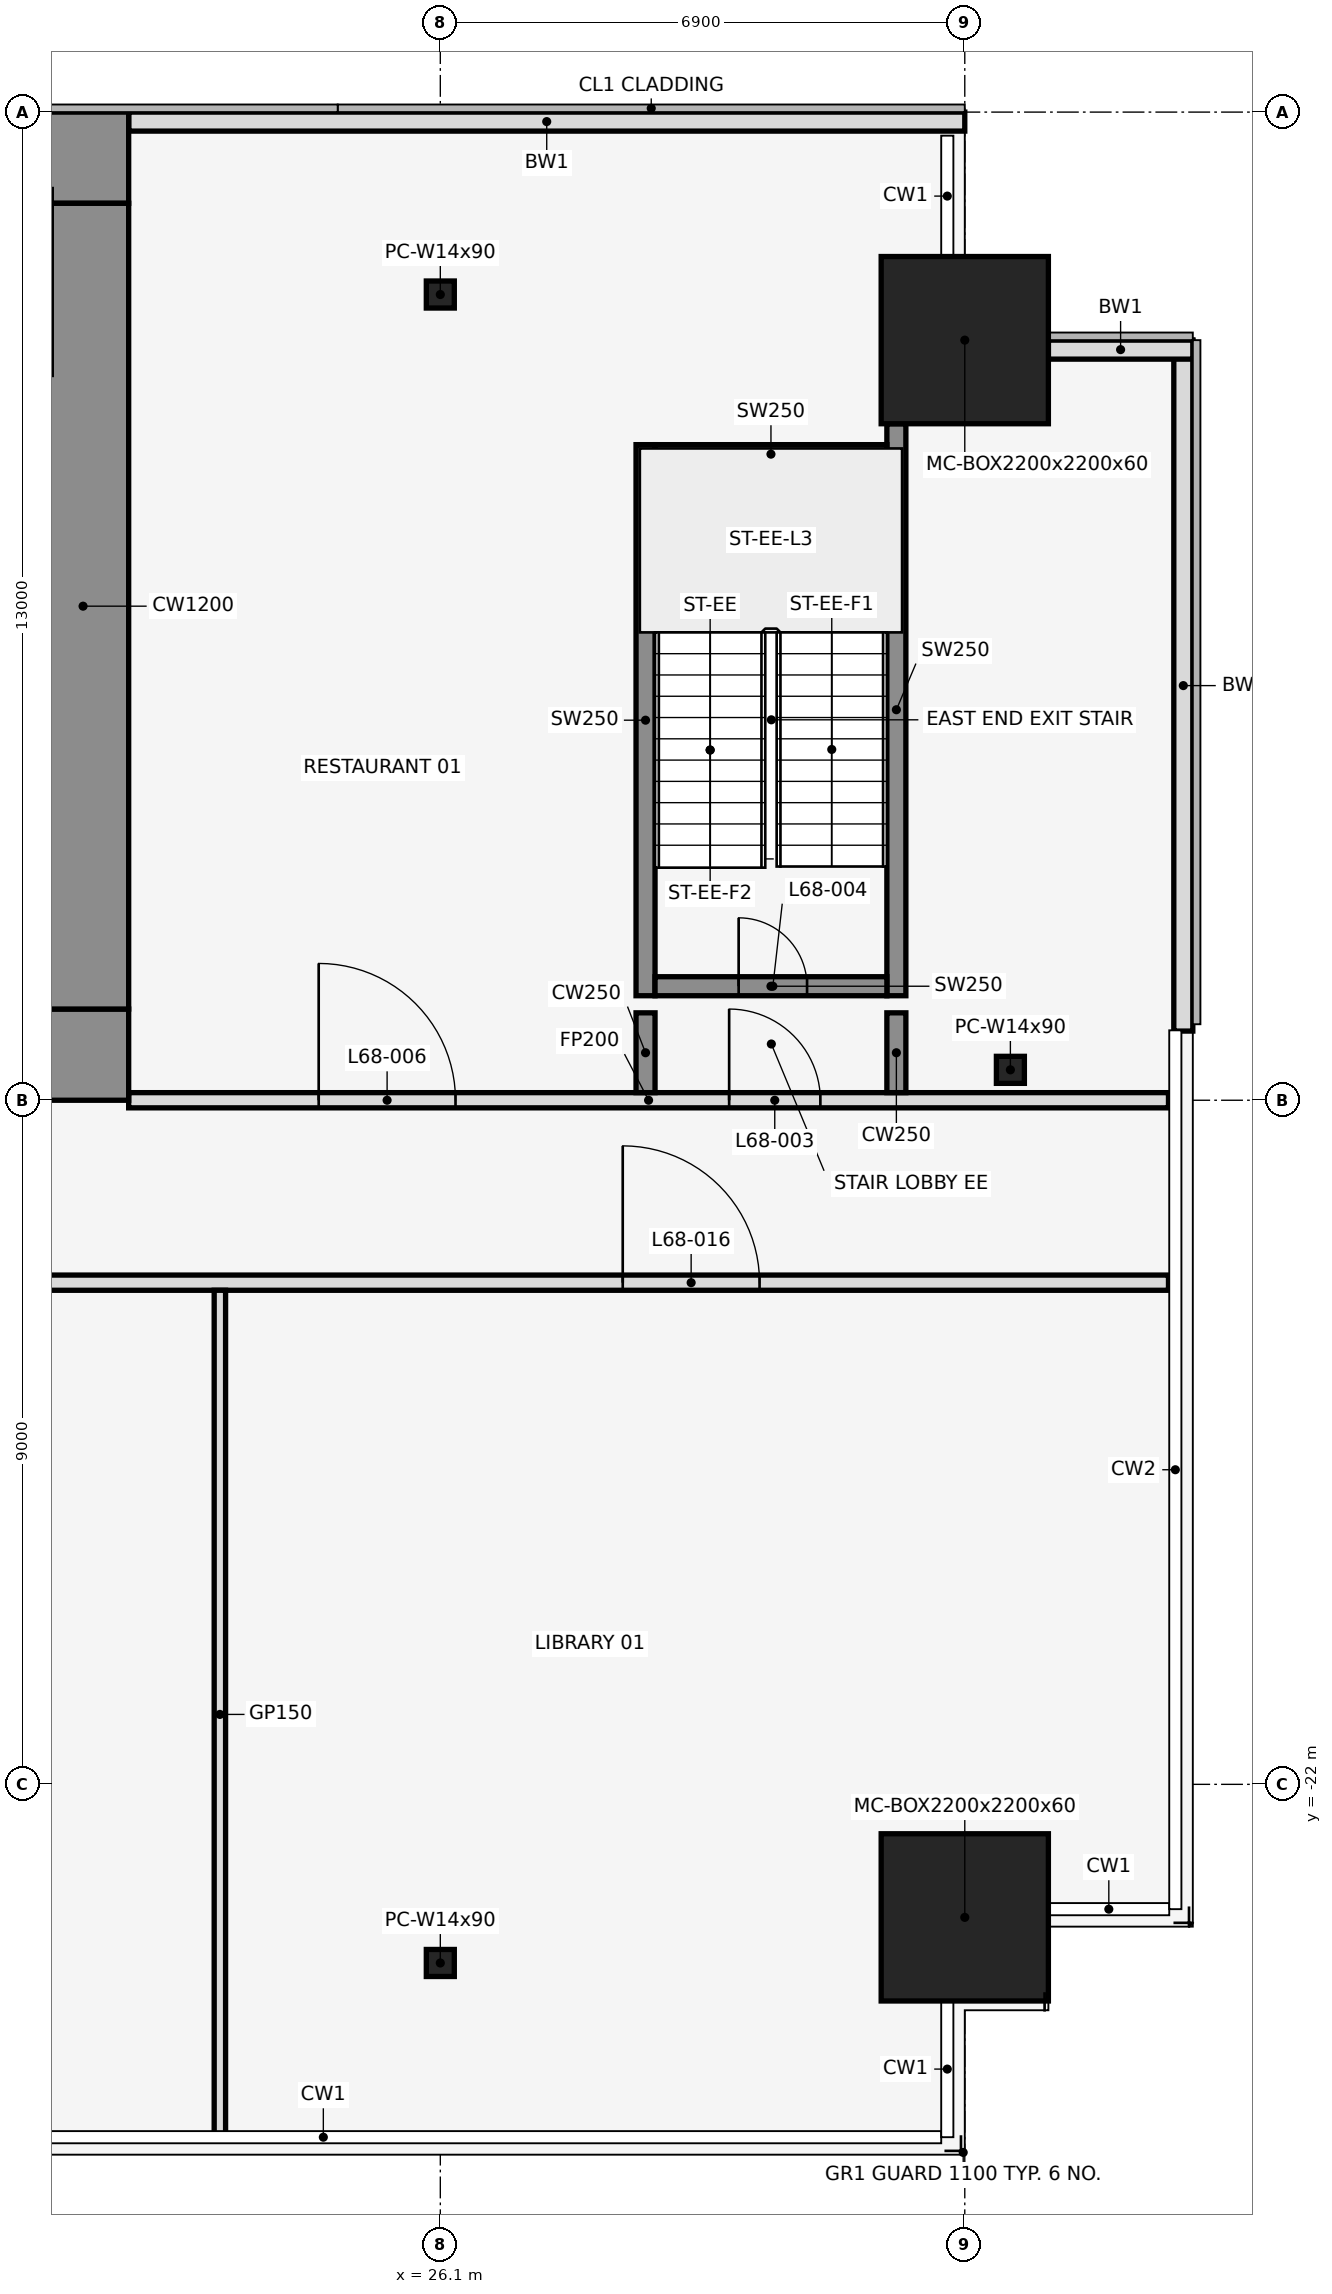
"""IFC4 building model, lengths in metres.
Left out: names, types, materials, properties, quantities, classifications, styles, units other than length and angle.
Written with IfcOpenShell. Run it as: python <this file> out.ifc"""

import sys

from ifc_helpers import new_model, si_unit, direction, frame, frame_2d, origin, origin_2d, place, context, subcontext, project, spatial, rectangle, hollow_rectangle, i_section, extrude, element, fill, save


model = new_model("IFC4")
c1 = context("Model", 3, precision=1e-05, world=origin(), true_north=direction((0.0, 1.0)))
c2 = subcontext(c1, "Body", "Model", "MODEL_VIEW")
j1 = project(units=[si_unit("LENGTHUNIT", "METRE"), si_unit("PLANEANGLEUNIT", "RADIAN")], contexts=[c1])
p1 = place(None, origin())
s1 = spatial("IfcSite", under=j1, at=p1, CompositionType="ELEMENT")
p2 = place(p1, origin())
s2 = spatial("IfcBuilding", under=s1, at=p2, CompositionType="ELEMENT")
p3 = place(p2, frame((0.0, 0.0, 302.0)))
s3 = spatial("IfcBuildingStorey", under=s2, at=p3, CompositionType="ELEMENT", Elevation=302.0)
for number, where, z_axis, x_axis in (
    (1, (26.1, -24.35, 0.0), (0.0, 0.0, 1.0), (1.0, 0.0, 0.0)),
    (2, (26.1, -2.4, 0.0), (0.0, 0.0, 1.0), (1.0, 0.0, 0.0)),
):
    element("IfcColumn", number, at=place(p3, frame(where, z_axis=z_axis, x_axis=x_axis)), inside=s3, PredefinedType="COLUMN", context=c2, shape_type="SweptSolid", body=[
        extrude(i_section(OverallWidth=0.368, OverallDepth=0.356, WebThickness=0.011, FlangeThickness=0.018, at=origin_2d()), origin(), (0.0, 0.0, 1.0), 4.5),
    ])
for number, where, z_axis, x_axis in (
    (3, (33.0, -23.75, 0.0), (0.0, 0.0, 1.0), (1.0, 0.0, 0.0)),
    (4, (33.0, -3.0, 0.0), (0.0, 0.0, 1.0), (1.0, 0.0, 0.0)),
):
    element("IfcColumn", number, at=place(p3, frame(where, z_axis=z_axis, x_axis=x_axis)), inside=s3, PredefinedType="COLUMN", context=c2, shape_type="SweptSolid", body=[
        extrude(hollow_rectangle(XDim=2.2, YDim=2.2, WallThickness=0.06, at=origin_2d()), origin(), (0.0, 0.0, 1.0), 4.5),
    ])
p4 = place(p3, frame((33.6, -12.6, 0.0), z_axis=(0.0, 0.0, 1.0), x_axis=(1.0, 0.0, 0.0)))
e5 = element("IfcColumn", 5, at=p4, inside=s3, PredefinedType="COLUMN", context=c2, shape_type="SweptSolid", body=[
    extrude(i_section(OverallWidth=0.368, OverallDepth=0.356, WebThickness=0.011, FlangeThickness=0.018, at=origin_2d()), origin(), (0.0, 0.0, 1.0), 4.5),
])
p5 = place(p3, frame((33.0, -0.125, 0.0), z_axis=(0.0, 0.0, 1.0), x_axis=(-1.0, 0.0, 0.0)))
e6 = element("IfcWall", 6, at=p5, inside=s3, PredefinedType="STANDARD", context=c2, shape_type="SweptSolid", body=[
    extrude(rectangle(XDim=11.0, YDim=0.25, at=frame_2d((5.5, 0.0))), origin(), (0.0, 0.0, 1.0), 4.35),
])
p6 = place(p3, frame((35.875, -12.09, 0.0), z_axis=(0.0, 0.0, 1.0), x_axis=(0.0, 1.0, 0.0)))
e7 = element("IfcWall", 7, at=p6, inside=s3, PredefinedType="STANDARD", context=c2, shape_type="SweptSolid", body=[
    extrude(rectangle(XDim=9.09, YDim=0.25, at=frame_2d((4.545, 0.0))), origin(), (0.0, 0.0, 1.0), 4.35),
])
p7 = place(p3, frame((36.0, -3.125, 0.0), z_axis=(0.0, 0.0, 1.0), x_axis=(-1.0, 0.0, 0.0)))
e8 = element("IfcWall", 8, at=p7, inside=s3, PredefinedType="STANDARD", context=c2, shape_type="SweptSolid", body=[
    extrude(rectangle(XDim=1.9, YDim=0.25, at=frame_2d((0.95, 0.0))), origin(), (0.0, 0.0, 1.0), 4.35),
])
p8 = place(p3, frame((28.8, -11.625, 0.0), z_axis=(0.0, 0.0, 1.0), x_axis=(0.0, 1.0, 0.0)))
e9 = element("IfcWall", 9, at=p8, inside=s3, PredefinedType="SHEAR", context=c2, shape_type="SweptSolid", body=[
    extrude(rectangle(XDim=7.25, YDim=0.25, at=frame_2d((3.625, 0.0))), origin(), (0.0, 0.0, 1.0), 4.5),
])
p9 = place(p3, frame((32.1, -11.625, 0.0), z_axis=(0.0, 0.0, 1.0), x_axis=(0.0, 1.0, 0.0)))
e10 = element("IfcWall", 10, at=p9, inside=s3, PredefinedType="SHEAR", context=c2, shape_type="SweptSolid", body=[
    extrude(rectangle(XDim=7.525, YDim=0.25, at=frame_2d((3.762, 0.0))), origin(), (0.0, 0.0, 1.0), 4.5),
])
p10 = place(p3, frame((28.925, -11.5, 0.0), z_axis=(0.0, 0.0, 1.0), x_axis=(1.0, 0.0, 0.0)))
e11 = element("IfcWall", 11, at=p10, inside=s3, PredefinedType="SHEAR", context=c2, shape_type="SweptSolid", body=[
    extrude(rectangle(XDim=3.05, YDim=0.25, at=frame_2d((1.525, 0.0))), origin(), (0.0, 0.0, 1.0), 4.5),
])
p11 = place(p10, frame((1.1, 0.0, 0.0)))
e12 = element("IfcOpeningElement", 12, at=p11, cuts=e11, PredefinedType="OPENING", context=c2, shape_type="SweptSolid", body=[
    extrude(rectangle(XDim=0.9, YDim=2.1, at=frame_2d((0.45, 1.05))), frame((0.0, 0.137, 0.0), z_axis=(0.0, -1.0, 0.0), x_axis=(1.0, 0.0, 0.0)), (0.0, 0.0, 1.0), 0.274),
])
p12 = place(p3, frame((28.925, -4.5, 0.0), z_axis=(0.0, 0.0, 1.0), x_axis=(1.0, 0.0, 0.0)))
e13 = element("IfcWall", 13, at=p12, inside=s3, PredefinedType="SHEAR", context=c2, shape_type="SweptSolid", body=[
    extrude(rectangle(XDim=3.05, YDim=0.25, at=frame_2d((1.525, 0.0))), origin(), (0.0, 0.0, 1.0), 4.5),
])
p13 = place(p3, frame((1.4, -15.4, 0.0), z_axis=(0.0, 0.0, 1.0), x_axis=(1.0, 0.0, 0.0)))
e14 = element("IfcWall", 14, at=p13, inside=s3, PredefinedType="PARTITIONING", context=c2, shape_type="SweptSolid", body=[
    extrude(rectangle(XDim=34.28, YDim=0.2, at=frame_2d((17.14, 0.0))), origin(), (0.0, 0.0, 1.0), 3.418),
])
p14 = place(p13, frame((4.2, 0.0, 0.0)))
e15 = element("IfcOpeningElement", 15, at=p14, cuts=e14, PredefinedType="OPENING", context=c2, shape_type="SweptSolid", body=[
    extrude(rectangle(XDim=1.8, YDim=2.1, at=frame_2d((0.9, 1.05))), frame((0.0, 0.112, 0.0), z_axis=(0.0, -1.0, 0.0), x_axis=(1.0, 0.0, 0.0)), (0.0, 0.0, 1.0), 0.224),
])
p15 = place(p13, frame((15.5, 0.0, 0.0)))
e16 = element("IfcOpeningElement", 16, at=p15, cuts=e14, PredefinedType="OPENING", context=c2, shape_type="SweptSolid", body=[
    extrude(rectangle(XDim=1.0, YDim=2.1, at=frame_2d((0.5, 1.05))), frame((0.0, 0.112, 0.0), z_axis=(0.0, -1.0, 0.0), x_axis=(1.0, 0.0, 0.0)), (0.0, 0.0, 1.0), 0.224),
])
p16 = place(p13, frame((27.1, 0.0, 0.0)))
e17 = element("IfcOpeningElement", 17, at=p16, cuts=e14, PredefinedType="OPENING", context=c2, shape_type="SweptSolid", body=[
    extrude(rectangle(XDim=1.8, YDim=2.1, at=frame_2d((0.9, 1.05))), frame((0.0, 0.112, 0.0), z_axis=(0.0, -1.0, 0.0), x_axis=(1.0, 0.0, 0.0)), (0.0, 0.0, 1.0), 0.224),
])
p17 = place(p3, frame((22.0, -13.0, 0.0), z_axis=(0.0, 0.0, 1.0), x_axis=(1.0, 0.0, 0.0)))
e18 = element("IfcWall", 18, at=p17, inside=s3, PredefinedType="PARTITIONING", context=c2, shape_type="SweptSolid", body=[
    extrude(rectangle(XDim=13.68, YDim=0.2, at=frame_2d((6.84, 0.0))), origin(), (0.0, 0.0, 1.0), 3.418),
])
p18 = place(p17, frame((7.9, 0.0, 0.0)))
e19 = element("IfcOpeningElement", 19, at=p18, cuts=e18, PredefinedType="OPENING", context=c2, shape_type="SweptSolid", body=[
    extrude(rectangle(XDim=1.2, YDim=2.1, at=frame_2d((0.6, 1.05))), frame((0.0, 0.112, 0.0), z_axis=(0.0, -1.0, 0.0), x_axis=(1.0, 0.0, 0.0)), (0.0, 0.0, 1.0), 0.224),
])
p19 = place(p17, frame((2.5, 0.0, 0.0)))
e20 = element("IfcOpeningElement", 20, at=p19, cuts=e18, PredefinedType="OPENING", context=c2, shape_type="SweptSolid", body=[
    extrude(rectangle(XDim=1.8, YDim=2.1, at=frame_2d((0.9, 1.05))), frame((0.0, 0.112, 0.0), z_axis=(0.0, -1.0, 0.0), x_axis=(1.0, 0.0, 0.0)), (0.0, 0.0, 1.0), 0.224),
])
p20 = place(p3, frame((23.2, -26.66, 0.0), z_axis=(0.0, 0.0, 1.0), x_axis=(0.0, 1.0, 0.0)))
e21 = element("IfcWall", 21, at=p20, inside=s3, PredefinedType="PARTITIONING", context=c2, shape_type="SweptSolid", body=[
    extrude(rectangle(XDim=11.16, YDim=0.15, at=frame_2d((5.58, 0.0))), origin(), (0.0, 0.0, 1.0), 3.418),
])
for number, where, z_axis, x_axis in (
    (22, (28.8, -12.9, 0.0), (0.0, 0.0, 1.0), (0.0, 1.0, 0.0)),
    (23, (32.1, -12.9, 0.0), (0.0, 0.0, 1.0), (0.0, 1.0, 0.0)),
):
    element("IfcWall", number, at=place(p3, frame(where, z_axis=z_axis, x_axis=x_axis)), inside=s3, PredefinedType="SHEAR", context=c2, shape_type="SweptSolid", body=[
        extrude(rectangle(XDim=1.05, YDim=0.25, at=frame_2d((0.525, 0.0))), origin(), (0.0, 0.0, 1.0), 4.5),
    ])
p21 = place(p3, frame((-22.0, -0.6, 0.0), z_axis=(0.0, 0.0, 1.0), x_axis=(1.0, 0.0, 0.0)))
e24 = element("IfcWall", 24, at=p21, inside=s3, PredefinedType="SHEAR", context=c2, shape_type="SweptSolid", body=[
    extrude(rectangle(XDim=44.0, YDim=1.2, at=frame_2d((22.0, 0.0))), origin(), (0.0, 0.0, 1.0), 4.5),
])
p22 = place(p21, frame((18.55, 0.0, 0.0)))
e25 = element("IfcOpeningElement", 25, at=p22, cuts=e24, PredefinedType="OPENING", context=c2, shape_type="SweptSolid", body=[
    extrude(rectangle(XDim=0.9, YDim=2.1, at=frame_2d((0.45, 1.05))), frame((0.0, 0.612, 0.0), z_axis=(0.0, -1.0, 0.0), x_axis=(1.0, 0.0, 0.0)), (0.0, 0.0, 1.0), 1.224),
])
p23 = place(p21, frame((24.55, 0.0, 0.0)))
e26 = element("IfcOpeningElement", 26, at=p23, cuts=e24, PredefinedType="OPENING", context=c2, shape_type="SweptSolid", body=[
    extrude(rectangle(XDim=0.9, YDim=2.1, at=frame_2d((0.45, 1.05))), frame((0.0, 0.612, 0.0), z_axis=(0.0, -1.0, 0.0), x_axis=(1.0, 0.0, 0.0)), (0.0, 0.0, 1.0), 1.224),
])
p24 = place(p3, frame((-22.0, -12.4, 0.0), z_axis=(0.0, 0.0, 1.0), x_axis=(1.0, 0.0, 0.0)))
e27 = element("IfcWall", 27, at=p24, inside=s3, PredefinedType="SHEAR", context=c2, shape_type="SweptSolid", body=[
    extrude(rectangle(XDim=44.0, YDim=1.2, at=frame_2d((22.0, 0.0))), origin(), (0.0, 0.0, 1.0), 4.5),
])
p25 = place(p24, frame((2.2, 0.0, 0.0)))
e28 = element("IfcOpeningElement", 28, at=p25, cuts=e27, PredefinedType="OPENING", context=c2, shape_type="SweptSolid", body=[
    extrude(rectangle(XDim=1.2, YDim=2.1, at=frame_2d((0.6, 1.05))), frame((0.0, 0.612, 0.0), z_axis=(0.0, -1.0, 0.0), x_axis=(1.0, 0.0, 0.0)), (0.0, 0.0, 1.0), 1.224),
])
p26 = place(p24, frame((21.4, 0.0, 0.0)))
e29 = element("IfcOpeningElement", 29, at=p26, cuts=e27, PredefinedType="OPENING", context=c2, shape_type="SweptSolid", body=[
    extrude(rectangle(XDim=1.2, YDim=2.1, at=frame_2d((0.6, 1.05))), frame((0.0, 0.612, 0.0), z_axis=(0.0, -1.0, 0.0), x_axis=(1.0, 0.0, 0.0)), (0.0, 0.0, 1.0), 1.224),
])
p27 = place(p24, frame((40.6, 0.0, 0.0)))
e30 = element("IfcOpeningElement", 30, at=p27, cuts=e27, PredefinedType="OPENING", context=c2, shape_type="SweptSolid", body=[
    extrude(rectangle(XDim=1.2, YDim=2.1, at=frame_2d((0.6, 1.05))), frame((0.0, 0.612, 0.0), z_axis=(0.0, -1.0, 0.0), x_axis=(1.0, 0.0, 0.0)), (0.0, 0.0, 1.0), 1.224),
])
p28 = place(p24, frame((16.0, 0.0, 0.0)))
e31 = element("IfcOpeningElement", 31, at=p28, cuts=e27, PredefinedType="OPENING", context=c2, shape_type="SweptSolid", body=[
    extrude(rectangle(XDim=1.8, YDim=2.1, at=frame_2d((0.9, 1.05))), frame((0.0, 0.612, 0.0), z_axis=(0.0, -1.0, 0.0), x_axis=(1.0, 0.0, 0.0)), (0.0, 0.0, 1.0), 1.224),
])
p29 = place(p24, frame((6.3, 0.0, 0.0)))
e32 = element("IfcOpeningElement", 32, at=p29, cuts=e27, PredefinedType="OPENING", context=c2, shape_type="SweptSolid", body=[
    extrude(rectangle(XDim=1.2, YDim=2.1, at=frame_2d((0.6, 1.05))), frame((0.0, 0.612, 0.0), z_axis=(0.0, -1.0, 0.0), x_axis=(1.0, 0.0, 0.0)), (0.0, 0.0, 1.0), 1.224),
])
p30 = place(p24, frame((26.2, 0.0, 0.0)))
e33 = element("IfcOpeningElement", 33, at=p30, cuts=e27, PredefinedType="OPENING", context=c2, shape_type="SweptSolid", body=[
    extrude(rectangle(XDim=1.8, YDim=2.1, at=frame_2d((0.9, 1.05))), frame((0.0, 0.612, 0.0), z_axis=(0.0, -1.0, 0.0), x_axis=(1.0, 0.0, 0.0)), (0.0, 0.0, 1.0), 1.224),
])
p31 = place(p24, frame((36.5, 0.0, 0.0)))
e34 = element("IfcOpeningElement", 34, at=p31, cuts=e27, PredefinedType="OPENING", context=c2, shape_type="SweptSolid", body=[
    extrude(rectangle(XDim=1.2, YDim=2.1, at=frame_2d((0.6, 1.05))), frame((0.0, 0.612, 0.0), z_axis=(0.0, -1.0, 0.0), x_axis=(1.0, 0.0, 0.0)), (0.0, 0.0, 1.0), 1.224),
])
p32 = place(p3, frame((21.4, -11.8, 0.0), z_axis=(0.0, 0.0, 1.0), x_axis=(0.0, 1.0, 0.0)))
e35 = element("IfcWall", 35, at=p32, inside=s3, PredefinedType="SHEAR", context=c2, shape_type="SweptSolid", body=[
    extrude(rectangle(XDim=10.6, YDim=1.2, at=frame_2d((5.3, 0.0))), origin(), (0.0, 0.0, 1.0), 4.5),
])
p33 = place(p18, origin())
e36 = element("IfcDoor", 36, at=p33, inside=s3, OperationType="SINGLE_SWING_RIGHT", PredefinedType="DOOR", context=c2, shape_type="SweptSolid", body=[
    extrude(rectangle(XDim=1.2, YDim=2.1, at=frame_2d((0.6, 1.05))), frame((0.0, 0.025, 0.0), z_axis=(0.0, -1.0, 0.0), x_axis=(1.0, 0.0, 0.0)), (0.0, 0.0, 1.0), 0.05),
])
fill(e19, e36)
p34 = place(p11, origin())
e37 = element("IfcDoor", 37, at=p34, inside=s3, OperationType="SINGLE_SWING_LEFT", PredefinedType="DOOR", context=c2, shape_type="SweptSolid", body=[
    extrude(rectangle(XDim=0.9, YDim=2.1, at=frame_2d((0.45, 1.05))), frame((0.0, 0.025, 0.0), z_axis=(0.0, -1.0, 0.0), x_axis=(1.0, 0.0, 0.0)), (0.0, 0.0, 1.0), 0.05),
])
fill(e12, e37)
p35 = place(p19, origin())
e38 = element("IfcDoor", 38, at=p35, inside=s3, OperationType="SINGLE_SWING_LEFT", PredefinedType="DOOR", context=c2, shape_type="SweptSolid", body=[
    extrude(rectangle(XDim=1.8, YDim=2.1, at=frame_2d((0.9, 1.05))), frame((0.0, 0.025, 0.0), z_axis=(0.0, -1.0, 0.0), x_axis=(1.0, 0.0, 0.0)), (0.0, 0.0, 1.0), 0.05),
])
fill(e20, e38)
p36 = place(p16, origin())
e39 = element("IfcDoor", 39, at=p36, inside=s3, OperationType="SINGLE_SWING_LEFT", PredefinedType="DOOR", context=c2, shape_type="SweptSolid", body=[
    extrude(rectangle(XDim=1.8, YDim=2.1, at=frame_2d((0.9, 1.05))), frame((0.0, 0.025, 0.0), z_axis=(0.0, -1.0, 0.0), x_axis=(1.0, 0.0, 0.0)), (0.0, 0.0, 1.0), 0.05),
])
fill(e17, e39)
save(model, sys.argv[1])
